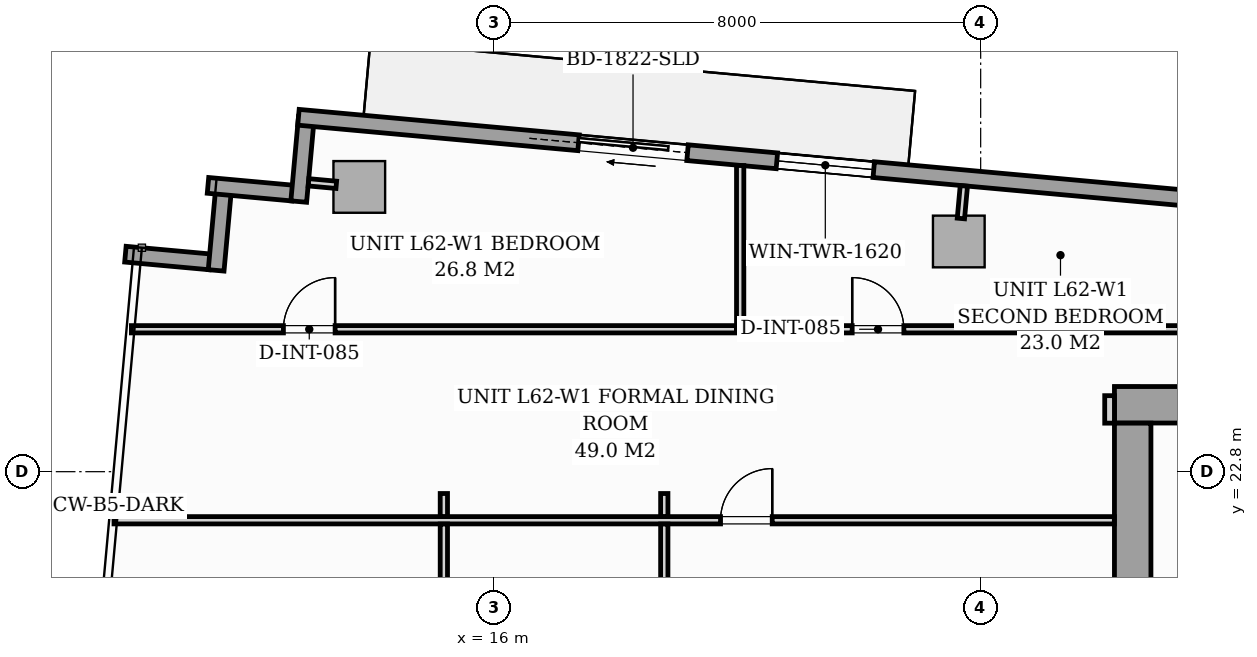
"""IFC4 building model, lengths in metres.
Left out: names, types, materials, properties, quantities, classifications, styles, units other than length and angle.
Written with IfcOpenShell. Run it as: python <this file> out.ifc"""

import sys

from ifc_helpers import new_model, si_unit, direction, frame, frame_2d, origin, origin_2d, place, context, subcontext, project, spatial, rectangle, i_section, extrude, source, transform, mapped, element, fill, save


model = new_model("IFC4")
c1 = context("Model", 3, precision=1e-05, world=origin(), true_north=direction((0.0, 1.0)))
c2 = subcontext(c1, "Body", "Model", "MODEL_VIEW")
j1 = project(units=[si_unit("LENGTHUNIT", "METRE"), si_unit("PLANEANGLEUNIT", "RADIAN")], contexts=[c1])
p1 = place(None, origin())
s1 = spatial("IfcSite", under=j1, at=p1, CompositionType="ELEMENT")
p2 = place(p1, origin())
s2 = spatial("IfcBuilding", under=s1, at=p2, CompositionType="ELEMENT")
p3 = place(p2, frame((0.0, 0.0, 216.6)))
s3 = spatial("IfcBuildingStorey", under=s2, at=p3, CompositionType="ELEMENT", Elevation=216.6)
m1 = source(origin(), c2, "Body", "SweptSolid", [
    extrude(i_section(OverallWidth=0.409, OverallDepth=0.425, WebThickness=0.033, FlangeThickness=0.052, FilletRadius=0.018, at=origin_2d()), origin(), (0.0, 0.0, 1.0), 3.296),
])
p4 = place(p3, frame((26.4, 24.0, 0.002), z_axis=(0.0, 0.0, 1.0), x_axis=(1.0, 0.0, 0.0)))
e1 = element("IfcColumn", 1, at=p4, inside=s3, PredefinedType="PILASTER", context=c2, shape_type="MappedRepresentation", body=[
    mapped(m1, transform((0.0, 0.0, 0.0), scale=1.0)),
])
m2 = source(origin(), c2, "Body", "SweptSolid", [
    extrude(rectangle(XDim=0.85, YDim=0.85, at=origin_2d()), origin(), (0.0, 0.0, 1.0), 3.294),
])
for number, where, z_axis, x_axis in (
    (2, (13.781, 27.483, 0.004), (0.0, 0.0, 1.0), (0.996, -0.091, 0.0)),
    (3, (23.64, 26.585, 0.004), (0.0, 0.0, 1.0), (0.996, -0.091, 0.0)),
):
    element("IfcColumn", number, at=place(p3, frame(where, z_axis=z_axis, x_axis=x_axis)), inside=s3, PredefinedType="COLUMN", context=c2, shape_type="MappedRepresentation", body=[
        mapped(m2, transform((0.0, 0.0, 0.0), scale=1.0)),
    ])
for number, where, z_axis, x_axis in (
    (4, (9.935, 26.377, 0.0), (0.0, 0.0, 1.0), (0.996, -0.091, 0.0)),
    (5, (11.427, 26.111, 0.0), (0.0, 0.0, 1.0), (0.091, 0.996, 0.0)),
):
    element("IfcWall", number, at=place(p3, frame(where, z_axis=z_axis, x_axis=x_axis)), inside=s3, PredefinedType="STANDARD", context=c2, shape_type="SweptSolid", body=[
        extrude(rectangle(XDim=1.395, YDim=0.26, at=frame_2d((0.698, 0.0))), origin(), (0.0, 0.0, 1.0), 3.04),
    ])
p5 = place(p3, frame((11.293, 27.508, 0.0), z_axis=(0.0, 0.0, 1.0), x_axis=(0.995883159782, -0.090646191665, 0.0)))
e6 = element("IfcWall", 6, at=p5, inside=s3, PredefinedType="STANDARD", context=c2, shape_type="SweptSolid", body=[
    extrude(rectangle(XDim=1.395, YDim=0.26, at=frame_2d((0.698, 0.0))), origin(), (0.0, 0.0, 1.0), 3.04),
])
p6 = place(p3, frame((12.785, 27.242, 0.0), z_axis=(0.0, 0.0, 1.0), x_axis=(0.090472632758, 0.995898942023, 0.0)))
e7 = element("IfcWall", 7, at=p6, inside=s3, PredefinedType="STANDARD", context=c2, shape_type="SweptSolid", body=[
    extrude(rectangle(XDim=1.395, YDim=0.26, at=frame_2d((0.698, 0.0))), origin(), (0.0, 0.0, 1.0), 3.04),
])
p7 = place(p3, frame((12.781, 28.628, 0.0), z_axis=(0.0, 0.0, 1.0), x_axis=(0.995884584572, -0.090630536861, 0.0)))
e8 = element("IfcWall", 8, at=p7, inside=s3, PredefinedType="STANDARD", context=c2, shape_type="SweptSolid", body=[
    extrude(rectangle(XDim=14.63, YDim=0.26, at=frame_2d((7.315, 0.0))), origin(), (0.0, 0.0, 1.0), 3.04),
])
p8 = place(p7, frame((4.625, 0.0, 0.0)))
e9 = element("IfcOpeningElement", 9, at=p8, cuts=e8, PredefinedType="OPENING", context=c2, shape_type="SweptSolid", body=[
    extrude(rectangle(XDim=1.8, YDim=2.06, at=frame_2d((0.9, 1.03))), frame((0.0, 0.14, 0.0), z_axis=(0.0, -1.0, 0.0), x_axis=(1.0, 0.0, 0.0)), (0.0, 0.0, 1.0), 0.28),
])
p9 = place(p7, frame((7.9, 0.0, 0.65)))
e10 = element("IfcOpeningElement", 10, at=p9, cuts=e8, PredefinedType="OPENING", context=c2, shape_type="SweptSolid", body=[
    extrude(rectangle(XDim=1.6, YDim=1.5, at=frame_2d((0.8, 0.75))), frame((0.0, 0.14, 0.0), z_axis=(0.0, -1.0, 0.0), x_axis=(1.0, 0.0, 0.0)), (0.0, 0.0, 1.0), 0.28),
])
p10 = place(p3, frame((26.2, 23.9, 0.0), z_axis=(0.0, 0.0, 1.0), x_axis=(1.0, 0.0, 0.0)))
e11 = element("IfcWall", 11, at=p10, inside=s3, PredefinedType="SHEAR", context=c2, shape_type="SweptSolid", body=[
    extrude(rectangle(XDim=19.6, YDim=0.6, at=frame_2d((9.8, 0.0))), origin(), (0.0, 0.0, 1.0), 3.3),
])
p11 = place(p3, frame((26.5, 17.802, 0.0), z_axis=(0.0, 0.0, 1.0), x_axis=(0.0, 1.0, 0.0)))
e12 = element("IfcWall", 12, at=p11, inside=s3, PredefinedType="SHEAR", context=c2, shape_type="SweptSolid", body=[
    extrude(rectangle(XDim=5.796, YDim=0.6, at=frame_2d((2.898, 0.0))), origin(), (0.0, 0.0, 1.0), 3.3),
])
p12 = place(p3, frame((26.12, 23.598, 0.0), z_axis=(0.0, 0.0, 1.0), x_axis=(0.0, 1.0, 0.0)))
e13 = element("IfcWall", 13, at=p12, inside=s3, PredefinedType="PARTITIONING", context=c2, shape_type="SweptSolid", body=[
    extrude(rectangle(XDim=0.452, YDim=0.16, at=frame_2d((0.226, 0.0))), origin(), (0.0, 0.0, 1.0), 3.04),
])
p13 = place(p3, frame((20.045, 25.142, 0.0), z_axis=(0.0, 0.0, 1.0), x_axis=(0.0, 1.0, 0.0)))
e14 = element("IfcWall", 14, at=p13, inside=s3, PredefinedType="PARTITIONING", context=c2, shape_type="SweptSolid", body=[
    extrude(rectangle(XDim=2.692, YDim=0.12, at=frame_2d((1.346, 0.0))), origin(), (0.0, 0.0, 1.0), 3.04),
])
p14 = place(p3, frame((10.034, 25.142, 0.0), z_axis=(0.0, 0.0, 1.0), x_axis=(1.0, 0.0, 0.0)))
e15 = element("IfcWall", 15, at=p14, inside=s3, PredefinedType="PARTITIONING", context=c2, shape_type="SweptSolid", body=[
    extrude(rectangle(XDim=9.949, YDim=0.12, at=frame_2d((4.975, 0.0))), origin(), (0.0, 0.0, 1.0), 3.04),
])
p15 = place(p14, frame((2.5, 0.0, 0.0)))
e16 = element("IfcOpeningElement", 16, at=p15, cuts=e15, PredefinedType="OPENING", context=c2, shape_type="SweptSolid", body=[
    extrude(rectangle(XDim=0.85, YDim=2.05, at=frame_2d((0.425, 1.025))), frame((0.0, 0.07, 0.0), z_axis=(0.0, -1.0, 0.0), x_axis=(1.0, 0.0, 0.0)), (0.0, 0.0, 1.0), 0.14),
])
p16 = place(p3, frame((20.107, 25.142, 0.0), z_axis=(0.0, 0.0, 1.0), x_axis=(1.0, 0.0, 0.0)))
e17 = element("IfcWall", 17, at=p16, inside=s3, PredefinedType="PARTITIONING", context=c2, shape_type="SweptSolid", body=[
    extrude(rectangle(XDim=9.981, YDim=0.12, at=frame_2d((4.99, 0.0))), origin(), (0.0, 0.0, 1.0), 3.04),
])
p17 = place(p16, frame((1.78, 0.0, 0.0)))
e18 = element("IfcOpeningElement", 18, at=p17, cuts=e17, PredefinedType="OPENING", context=c2, shape_type="SweptSolid", body=[
    extrude(rectangle(XDim=0.85, YDim=2.05, at=frame_2d((0.425, 1.025))), frame((0.0, 0.07, 0.0), z_axis=(0.0, -1.0, 0.0), x_axis=(1.0, 0.0, 0.0)), (0.0, 0.0, 1.0), 0.14),
])
p18 = place(p3, frame((9.748, 22.001, 0.0), z_axis=(0.0, 0.0, 1.0), x_axis=(1.0, 0.0, 0.0)))
e19 = element("IfcWall", 19, at=p18, inside=s3, PredefinedType="PARTITIONING", context=c2, shape_type="SweptSolid", body=[
    extrude(rectangle(XDim=16.45, YDim=0.12, at=frame_2d((8.225, 0.0))), origin(), (0.0, 0.0, 1.0), 3.04),
])
p19 = place(p18, frame((9.974, 0.0, 0.0)))
e20 = element("IfcOpeningElement", 20, at=p19, cuts=e19, PredefinedType="OPENING", context=c2, shape_type="SweptSolid", body=[
    extrude(rectangle(XDim=0.85, YDim=2.05, at=frame_2d((0.425, 1.025))), frame((0.0, 0.07, 0.0), z_axis=(0.0, -1.0, 0.0), x_axis=(1.0, 0.0, 0.0)), (0.0, 0.0, 1.0), 0.14),
])
p20 = place(p3, frame((15.172, 11.858, 0.0), z_axis=(0.0, 0.0, 1.0), x_axis=(0.0, 1.0, 0.0)))
e21 = element("IfcWall", 21, at=p20, inside=s3, PredefinedType="PARTITIONING", context=c2, shape_type="SweptSolid", body=[
    extrude(rectangle(XDim=10.081, YDim=0.12, at=frame_2d((5.041, 0.0))), origin(), (0.0, 0.0, 1.0), 3.04),
])
p21 = place(p20, frame((6.02, 0.0, 0.0)))
e22 = element("IfcOpeningElement", 22, at=p21, cuts=e21, PredefinedType="OPENING", context=c2, shape_type="SweptSolid", body=[
    extrude(rectangle(XDim=0.85, YDim=2.05, at=frame_2d((0.425, 1.025))), frame((0.0, 0.07, 0.0), z_axis=(0.0, -1.0, 0.0), x_axis=(1.0, 0.0, 0.0)), (0.0, 0.0, 1.0), 0.14),
])
p22 = place(p3, frame((15.172, 22.063, 0.0), z_axis=(0.0, 0.0, 1.0), x_axis=(0.0, 1.0, 0.0)))
e23 = element("IfcWall", 23, at=p22, inside=s3, PredefinedType="PARTITIONING", context=c2, shape_type="SweptSolid", body=[
    extrude(rectangle(XDim=0.378, YDim=0.12, at=frame_2d((0.189, 0.0))), origin(), (0.0, 0.0, 1.0), 3.04),
])
p23 = place(p3, frame((18.797, 11.858, 0.0), z_axis=(0.0, 0.0, 1.0), x_axis=(0.0, 1.0, 0.0)))
e24 = element("IfcWall", 24, at=p23, inside=s3, PredefinedType="PARTITIONING", context=c2, shape_type="SweptSolid", body=[
    extrude(rectangle(XDim=10.081, YDim=0.12, at=frame_2d((5.041, 0.0))), origin(), (0.0, 0.0, 1.0), 3.04),
])
p24 = place(p23, frame((4.615, 0.0, 0.0)))
e25 = element("IfcOpeningElement", 25, at=p24, cuts=e24, PredefinedType="OPENING", context=c2, shape_type="SweptSolid", body=[
    extrude(rectangle(XDim=0.85, YDim=2.05, at=frame_2d((0.425, 1.025))), frame((0.0, 0.07, 0.0), z_axis=(0.0, -1.0, 0.0), x_axis=(1.0, 0.0, 0.0)), (0.0, 0.0, 1.0), 0.14),
])
p25 = place(p3, frame((18.797, 22.063, 0.0), z_axis=(0.0, 0.0, 1.0), x_axis=(0.0, 1.0, 0.0)))
e26 = element("IfcWall", 26, at=p25, inside=s3, PredefinedType="PARTITIONING", context=c2, shape_type="SweptSolid", body=[
    extrude(rectangle(XDim=0.378, YDim=0.12, at=frame_2d((0.189, 0.0))), origin(), (0.0, 0.0, 1.0), 3.04),
])
p26 = place(p3, frame((13.403, 27.517, 0.0), z_axis=(0.0, 0.0, 1.0), x_axis=(-0.995884462012, 0.090631883588, 0.0)))
e27 = element("IfcWall", 27, at=p26, inside=s3, PredefinedType="PARTITIONING", context=c2, shape_type="SweptSolid", body=[
    extrude(rectangle(XDim=0.458, YDim=0.12, at=frame_2d((0.229, 0.0))), origin(), (0.0, 0.0, 1.0), 3.04),
])
p27 = place(p3, frame((23.675, 26.964, 0.0), z_axis=(0.0, 0.0, 1.0), x_axis=(0.090740281653, 0.995874591144, 0.0)))
e28 = element("IfcWall", 28, at=p27, inside=s3, PredefinedType="PARTITIONING", context=c2, shape_type="SweptSolid", body=[
    extrude(rectangle(XDim=0.538, YDim=0.12, at=frame_2d((0.269, 0.0))), origin(), (0.0, 0.0, 1.0), 3.04),
])
m3 = source(origin(), c2, "Body", "SweptSolid", [
    extrude(rectangle(XDim=1.8, YDim=2.06, at=frame_2d((0.9, 1.03))), frame((0.0, 0.025, 0.0), z_axis=(0.0, -1.0, 0.0), x_axis=(1.0, 0.0, 0.0)), (0.0, 0.0, 1.0), 0.05),
])
p28 = place(p8, origin())
e29 = element("IfcDoor", 29, at=p28, inside=s3, OperationType="SLIDING_TO_LEFT", PredefinedType="DOOR", context=c2, shape_type="MappedRepresentation", body=[
    mapped(m3, transform((0.0, 0.0, 0.0), scale=1.0)),
])
fill(e9, e29)
m4 = source(origin(), c2, "Body", "SweptSolid", [
    extrude(rectangle(XDim=1.6, YDim=1.5, at=frame_2d((0.8, 0.75))), frame((0.0, 0.03, 0.0), z_axis=(0.0, -1.0, 0.0), x_axis=(1.0, 0.0, 0.0)), (0.0, 0.0, 1.0), 0.06),
])
p29 = place(p9, origin())
e30 = element("IfcWindow", 30, at=p29, inside=s3, PartitioningType="SINGLE_PANEL", PredefinedType="WINDOW", context=c2, shape_type="MappedRepresentation", body=[
    mapped(m4, transform((0.0, 0.0, 0.0), scale=1.0)),
])
fill(e10, e30)
m5 = source(origin(), c2, "Body", "SweptSolid", [
    extrude(rectangle(XDim=0.85, YDim=2.05, at=frame_2d((0.425, 1.025))), frame((0.0, 0.025, 0.0), z_axis=(0.0, -1.0, 0.0), x_axis=(1.0, 0.0, 0.0)), (0.0, 0.0, 1.0), 0.05),
])
p30 = place(p15, origin())
e31 = element("IfcDoor", 31, at=p30, inside=s3, OperationType="SINGLE_SWING_RIGHT", PredefinedType="DOOR", context=c2, shape_type="MappedRepresentation", body=[
    mapped(m5, transform((0.0, 0.0, 0.0), scale=1.0)),
])
fill(e16, e31)
p31 = place(p17, origin())
e32 = element("IfcDoor", 32, at=p31, inside=s3, OperationType="SINGLE_SWING_LEFT", PredefinedType="DOOR", context=c2, shape_type="MappedRepresentation", body=[
    mapped(m5, transform((0.0, 0.0, 0.0), scale=1.0)),
])
fill(e18, e32)
p32 = place(p19, origin())
e33 = element("IfcDoor", 33, at=p32, inside=s3, OperationType="SINGLE_SWING_RIGHT", PredefinedType="DOOR", context=c2, shape_type="MappedRepresentation", body=[
    mapped(m5, transform((0.0, 0.0, 0.0), scale=1.0)),
])
fill(e20, e33)
save(model, sys.argv[1])
